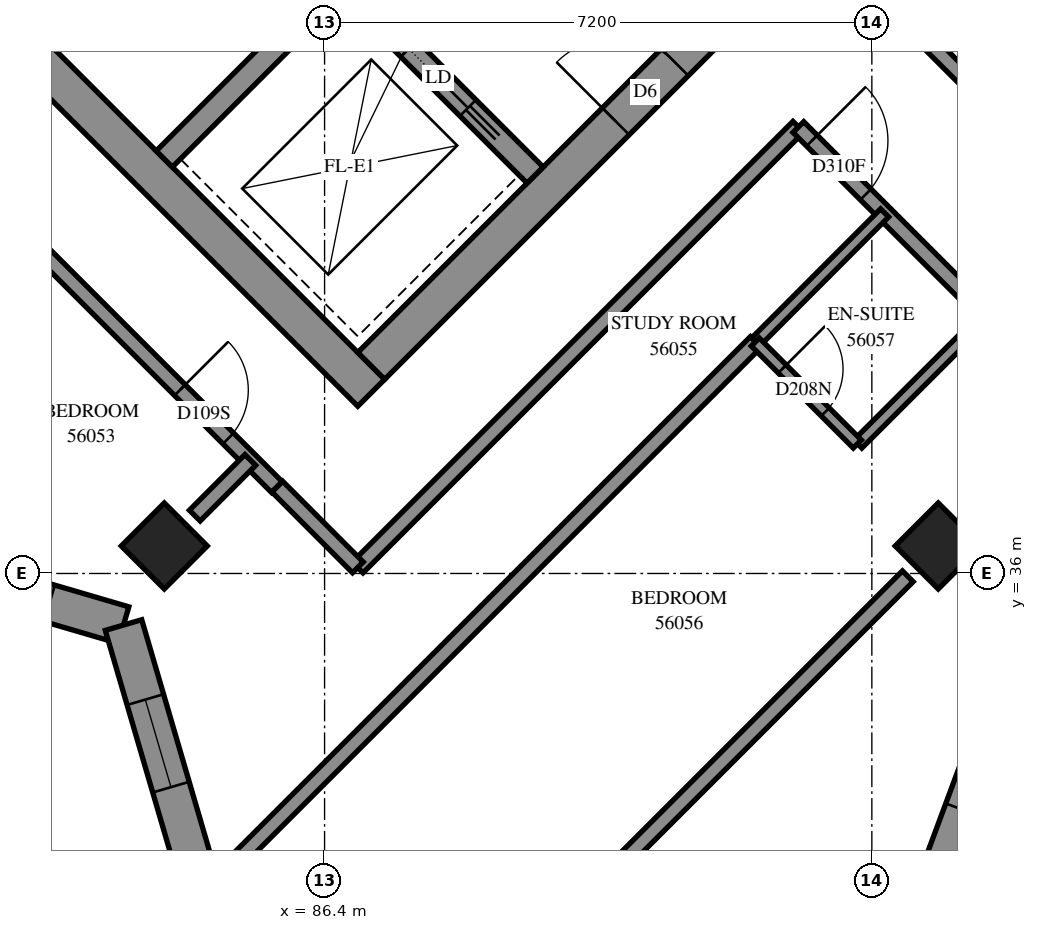
"""IFC4 building model, lengths in metres.
Left out: names, types, materials, properties, quantities, classifications, styles, units other than length and angle.
Written with IfcOpenShell. Run it as: python <this file> out.ifc"""

import sys

from ifc_helpers import new_model, si_unit, direction, frame, frame_2d, origin, origin_2d, place, context, subcontext, project, spatial, polyline, rectangle, outline, extrude, element, fill, save


model = new_model("IFC4")
c1 = context("Model", 3, precision=1e-05, world=origin(), true_north=direction((0.0, 1.0)))
c2 = subcontext(c1, "Body", "Model", "MODEL_VIEW")
j1 = project(units=[si_unit("LENGTHUNIT", "METRE"), si_unit("PLANEANGLEUNIT", "RADIAN")], contexts=[c1])
p1 = place(None, origin())
s1 = spatial("IfcSite", under=j1, at=p1, CompositionType="ELEMENT")
p2 = place(p1, origin())
s2 = spatial("IfcBuilding", under=s1, at=p2, CompositionType="ELEMENT")
p3 = place(p2, frame((0.0, 0.0, 206.6)))
s3 = spatial("IfcBuildingStorey", under=s2, at=p3, CompositionType="ELEMENT", Elevation=206.6)
for number, where, z_axis, x_axis in (
    (1, (84.291, 36.362, 0.0), (0.0, 0.0, 1.0), (0.707, -0.707, 0.0)),
    (2, (94.474, 36.362, 0.0), (0.0, 0.0, 1.0), (0.707, -0.707, 0.0)),
):
    element("IfcColumn", number, at=place(p3, frame(where, z_axis=z_axis, x_axis=x_axis)), inside=s3, PredefinedType="COLUMN", context=c2, shape_type="SweptSolid", body=[
        extrude(rectangle(XDim=0.8, YDim=0.8, at=origin_2d()), origin(), (0.0, 0.0, 1.0), 3.1),
    ])
p4 = place(p3, frame((76.124, 49.267, -0.3), z_axis=(0.0, 0.0, 1.0), x_axis=(0.7071067812, -0.7071067812, 0.0)))
e3 = element("IfcWall", 3, at=p4, inside=s3, PredefinedType="SHEAR", context=c2, shape_type="SweptSolid", body=[
    extrude(rectangle(XDim=15.4, YDim=0.5, at=frame_2d((7.7, 0.0))), origin(), (0.0, 0.0, 1.0), 2.7),
])
p5 = place(p3, frame((87.013, 38.731, -0.3), z_axis=(0.0, 0.0, 1.0), x_axis=(0.7071067812, 0.7071067812, 0.0)))
e4 = element("IfcWall", 4, at=p5, inside=s3, PredefinedType="SHEAR", context=c2, shape_type="SweptSolid", body=[
    extrude(rectangle(XDim=14.4, YDim=0.5, at=frame_2d((7.2, 0.0))), origin(), (0.0, 0.0, 1.0), 2.7),
])
p6 = place(p5, frame((4.55, 0.0, 0.3)))
e5 = element("IfcOpeningElement", 5, at=p6, cuts=e4, PredefinedType="OPENING", context=c2, shape_type="SweptSolid", body=[
    extrude(rectangle(XDim=1.1, YDim=2.1, at=frame_2d((0.55, 1.05))), frame((0.0, 0.26, 0.0), z_axis=(0.0, -1.0, 0.0), x_axis=(1.0, 0.0, 0.0)), (0.0, 0.0, 1.0), 0.52),
])
p7 = place(p5, frame((11.35, 0.0, 0.3)))
e6 = element("IfcOpeningElement", 6, at=p7, cuts=e4, PredefinedType="OPENING", context=c2, shape_type="SweptSolid", body=[
    extrude(rectangle(XDim=1.1, YDim=2.1, at=frame_2d((0.55, 1.05))), frame((0.0, 0.26, 0.0), z_axis=(0.0, -1.0, 0.0), x_axis=(1.0, 0.0, 0.0)), (0.0, 0.0, 1.0), 0.52),
])
p8 = place(p3, frame((84.291, 41.453, 0.0), z_axis=(0.0, 0.0, 1.0), x_axis=(0.7071067812, 0.7071067812, 0.0)))
e7 = element("IfcWall", 7, at=p8, inside=s3, PredefinedType="SOLIDWALL", context=c2, shape_type="SweptSolid", body=[
    extrude(rectangle(XDim=3.3, YDim=0.3, at=frame_2d((1.65, 0.0))), origin(), (0.0, 0.0, 1.0), 3.1),
])
p9 = place(p3, frame((78.988, 51.423, 0.0), z_axis=(0.0, 0.0, 1.0), x_axis=(0.7071067812, -0.7071067812, 0.0)))
e8 = element("IfcWall", 8, at=p9, inside=s3, PredefinedType="SOLIDWALL", context=c2, shape_type="SweptSolid", body=[
    extrude(rectangle(XDim=14.4, YDim=0.3, at=frame_2d((7.2, 0.0))), origin(), (0.0, 0.0, 1.0), 3.1),
])
p10 = place(p9, frame((1.35, 0.0, 0.0)))
e9 = element("IfcOpeningElement", 9, at=p10, cuts=e8, PredefinedType="OPENING", context=c2, shape_type="SweptSolid", body=[
    extrude(rectangle(XDim=0.9, YDim=2.1, at=frame_2d((0.45, 1.05))), frame((0.0, 0.16, 0.0), z_axis=(0.0, -1.0, 0.0), x_axis=(1.0, 0.0, 0.0)), (0.0, 0.0, 1.0), 0.32),
])
p11 = place(p9, frame((4.95, 0.0, 0.0)))
e10 = element("IfcOpeningElement", 10, at=p11, cuts=e8, PredefinedType="OPENING", context=c2, shape_type="SweptSolid", body=[
    extrude(rectangle(XDim=0.9, YDim=2.1, at=frame_2d((0.45, 1.05))), frame((0.0, 0.16, 0.0), z_axis=(0.0, -1.0, 0.0), x_axis=(1.0, 0.0, 0.0)), (0.0, 0.0, 1.0), 0.32),
])
p12 = place(p9, frame((8.55, 0.0, 0.0)))
e11 = element("IfcOpeningElement", 11, at=p12, cuts=e8, PredefinedType="OPENING", context=c2, shape_type="SweptSolid", body=[
    extrude(rectangle(XDim=0.9, YDim=2.1, at=frame_2d((0.45, 1.05))), frame((0.0, 0.16, 0.0), z_axis=(0.0, -1.0, 0.0), x_axis=(1.0, 0.0, 0.0)), (0.0, 0.0, 1.0), 0.32),
])
p13 = place(p9, frame((12.05, 0.0, 0.0)))
e12 = element("IfcOpeningElement", 12, at=p13, cuts=e8, PredefinedType="OPENING", context=c2, shape_type="SweptSolid", body=[
    extrude(rectangle(XDim=1.1, YDim=2.1, at=frame_2d((0.55, 1.05))), frame((0.0, 0.16, 0.0), z_axis=(0.0, -1.0, 0.0), x_axis=(1.0, 0.0, 0.0)), (0.0, 0.0, 1.0), 0.32),
])
p14 = place(p3, frame((94.281, 31.47, 0.0), z_axis=(0.0, 0.0, 1.0), x_axis=(0.3481903374, 0.9374238577, 0.0)))
e13 = element("IfcWall", 13, at=p14, inside=s3, PredefinedType="SOLIDWALL", context=c2, shape_type="SweptSolid", body=[
    extrude(outline(polyline([(-0.12, -0.25), (5.16, -0.25), (5.39, 0.25), (0.12, 0.25), (-0.12, -0.25)])), origin(), (0.0, 0.0, 1.0), 3.1),
])
p15 = place(p14, frame((1.512, 0.0, 0.45)))
e14 = element("IfcOpeningElement", 14, at=p15, cuts=e13, PredefinedType="OPENING", context=c2, shape_type="SweptSolid", body=[
    extrude(rectangle(XDim=1.3, YDim=2.5, at=frame_2d((0.65, 1.25))), frame((0.0, 0.26, 0.0), z_axis=(0.0, -1.0, 0.0), x_axis=(1.0, 0.0, 0.0)), (0.0, 0.0, 1.0), 0.52),
])
p16 = place(p14, frame((3.012, 0.0, 0.45)))
e15 = element("IfcOpeningElement", 15, at=p16, cuts=e13, PredefinedType="OPENING", context=c2, shape_type="SweptSolid", body=[
    extrude(rectangle(XDim=1.3, YDim=2.5, at=frame_2d((0.65, 1.25))), frame((0.0, 0.26, 0.0), z_axis=(0.0, -1.0, 0.0), x_axis=(1.0, 0.0, 0.0)), (0.0, 0.0, 1.0), 0.52),
])
p17 = place(p3, frame((79.361, 36.608, 0.0), z_axis=(0.0, 0.0, 1.0), x_axis=(0.9597039352, -0.2810130901, 0.0)))
e16 = element("IfcWall", 16, at=p17, inside=s3, PredefinedType="SOLIDWALL", context=c2, shape_type="SweptSolid", body=[
    extrude(outline(polyline([(-0.143, -0.25), (4.441, -0.25), (4.715, 0.25), (0.143, 0.25), (-0.143, -0.25)])), origin(), (0.0, 0.0, 1.0), 3.1),
])
p18 = place(p17, frame((0.563, 0.0, 0.45)))
e17 = element("IfcOpeningElement", 17, at=p18, cuts=e16, PredefinedType="OPENING", context=c2, shape_type="SweptSolid", body=[
    extrude(rectangle(XDim=1.3, YDim=2.5, at=frame_2d((0.65, 1.25))), frame((0.0, 0.26, 0.0), z_axis=(0.0, -1.0, 0.0), x_axis=(1.0, 0.0, 0.0)), (0.0, 0.0, 1.0), 0.52),
])
p19 = place(p17, frame((2.263, 0.0, 0.45)))
e18 = element("IfcOpeningElement", 18, at=p19, cuts=e16, PredefinedType="OPENING", context=c2, shape_type="SweptSolid", body=[
    extrude(rectangle(XDim=1.3, YDim=2.5, at=frame_2d((0.65, 1.25))), frame((0.0, 0.26, 0.0), z_axis=(0.0, -1.0, 0.0), x_axis=(1.0, 0.0, 0.0)), (0.0, 0.0, 1.0), 0.52),
])
p20 = place(p3, frame((83.755, 35.321, 0.0), z_axis=(0.0, 0.0, 1.0), x_axis=(0.2810130901, -0.9597039352, 0.0)))
e19 = element("IfcWall", 19, at=p20, inside=s3, PredefinedType="SOLIDWALL", context=c2, shape_type="SweptSolid", body=[
    extrude(outline(polyline([(0.137, -0.25), (4.721, -0.25), (4.435, 0.25), (-0.137, 0.25), (0.137, -0.25)])), origin(), (0.0, 0.0, 1.0), 3.1),
])
p21 = place(p20, frame((1.022, 0.0, 0.45)))
e20 = element("IfcOpeningElement", 20, at=p21, cuts=e19, PredefinedType="OPENING", context=c2, shape_type="SweptSolid", body=[
    extrude(rectangle(XDim=1.2, YDim=2.5, at=frame_2d((0.6, 1.25))), frame((0.0, 0.26, 0.0), z_axis=(0.0, -1.0, 0.0), x_axis=(1.0, 0.0, 0.0)), (0.0, 0.0, 1.0), 0.52),
])
p22 = place(p3, frame((84.996, 31.971, 0.0), z_axis=(0.0, 0.0, 1.0), x_axis=(0.7072316927, 0.7069818476, 0.0)))
e21 = element("IfcWall", 21, at=p22, inside=s3, PredefinedType="PARTITIONING", context=c2, shape_type="SweptSolid", body=[
    extrude(rectangle(XDim=10.006, YDim=0.2, at=frame_2d((5.003, 0.0))), origin(), (0.0, 0.0, 1.0), 3.1),
])
p23 = place(p3, frame((86.835, 36.079, 0.0), z_axis=(0.0, 0.0, 1.0), x_axis=(0.7071067812, 0.7071067812, 0.0)))
e22 = element("IfcWall", 22, at=p23, inside=s3, PredefinedType="PARTITIONING", context=c2, shape_type="SweptSolid", body=[
    extrude(rectangle(XDim=8.2, YDim=0.2, at=frame_2d((4.1, 0.0))), origin(), (0.0, 0.0, 1.0), 3.1),
])
p24 = place(p3, frame((80.849, 42.061, 0.0), z_axis=(0.0, 0.0, 1.0), x_axis=(0.7071067812, -0.7071067812, 0.0)))
e23 = element("IfcWall", 23, at=p24, inside=s3, PredefinedType="PARTITIONING", context=c2, shape_type="SweptSolid", body=[
    extrude(rectangle(XDim=6.964, YDim=0.2, at=frame_2d((3.482, 0.0))), origin(), (0.0, 0.0, 1.0), 3.1),
])
p25 = place(p24, frame((5.159, 0.0, 0.0)))
e24 = element("IfcOpeningElement", 24, at=p25, cuts=e23, PredefinedType="OPENING", context=c2, shape_type="SweptSolid", body=[
    extrude(rectangle(XDim=0.9, YDim=2.1, at=frame_2d((0.45, 1.05))), frame((0.0, 0.11, 0.0), z_axis=(0.0, -1.0, 0.0), x_axis=(1.0, 0.0, 0.0)), (0.0, 0.0, 1.0), 0.22),
])
p26 = place(p3, frame((89.781, 31.671, 0.0), z_axis=(0.0, 0.0, 1.0), x_axis=(0.7071067812, 0.7071067812, 0.0)))
e25 = element("IfcWall", 25, at=p26, inside=s3, PredefinedType="PARTITIONING", context=c2, shape_type="SweptSolid", body=[
    extrude(rectangle(XDim=6.07, YDim=0.2, at=frame_2d((3.035, 0.0))), origin(), (0.0, 0.0, 1.0), 2.6),
])
p27 = place(p3, frame((94.047, 43.287, 0.0), z_axis=(0.0, 0.0, 1.0), x_axis=(0.7071067812, -0.7071067812, 0.0)))
e26 = element("IfcWall", 26, at=p27, inside=s3, PredefinedType="PARTITIONING", context=c2, shape_type="SweptSolid", body=[
    extrude(rectangle(XDim=5.199, YDim=0.2, at=frame_2d((2.599, 0.0))), origin(), (0.0, 0.0, 1.0), 3.1),
])
p28 = place(p27, frame((3.898, 0.0, 0.0)))
e27 = element("IfcOpeningElement", 27, at=p28, cuts=e26, PredefinedType="OPENING", context=c2, shape_type="SweptSolid", body=[
    extrude(rectangle(XDim=0.9, YDim=2.1, at=frame_2d((0.45, 1.05))), frame((0.0, 0.11, 0.0), z_axis=(0.0, -1.0, 0.0), x_axis=(1.0, 0.0, 0.0)), (0.0, 0.0, 1.0), 0.22),
])
p29 = place(p3, frame((92.633, 41.873, 0.0), z_axis=(0.0, 0.0, 1.0), x_axis=(0.7071067812, -0.7071067812, 0.0)))
e28 = element("IfcWall", 28, at=p29, inside=s3, PredefinedType="PARTITIONING", context=c2, shape_type="SweptSolid", body=[
    extrude(rectangle(XDim=5.199, YDim=0.2, at=frame_2d((2.599, 0.0))), origin(), (0.0, 0.0, 1.0), 3.1),
])
p30 = place(p29, frame((0.253, 0.0, 0.0)))
e29 = element("IfcOpeningElement", 29, at=p30, cuts=e28, PredefinedType="OPENING", context=c2, shape_type="SweptSolid", body=[
    extrude(rectangle(XDim=1.0, YDim=2.1, at=frame_2d((0.5, 1.05))), frame((0.0, 0.11, 0.0), z_axis=(0.0, -1.0, 0.0), x_axis=(1.0, 0.0, 0.0)), (0.0, 0.0, 1.0), 0.22),
])
p31 = place(p29, frame((3.948, 0.0, 0.0)))
e30 = element("IfcOpeningElement", 30, at=p31, cuts=e28, PredefinedType="OPENING", context=c2, shape_type="SweptSolid", body=[
    extrude(rectangle(XDim=0.9, YDim=2.1, at=frame_2d((0.45, 1.05))), frame((0.0, 0.11, 0.0), z_axis=(0.0, -1.0, 0.0), x_axis=(1.0, 0.0, 0.0)), (0.0, 0.0, 1.0), 0.22),
])
for number, where, z_axis, x_axis in (
    (31, (92.072, 39.046, 0.0), (0.0, 0.0, 1.0), (0.707, 0.708, 0.0)),
    (32, (93.415, 37.703, 0.0), (0.0, 0.0, 1.0), (0.708, 0.707, 0.0)),
):
    element("IfcWall", number, at=place(p3, frame(where, z_axis=z_axis, x_axis=x_axis)), inside=s3, PredefinedType="PARTITIONING", context=c2, shape_type="SweptSolid", body=[
        extrude(rectangle(XDim=2.4, YDim=0.15, at=frame_2d((1.2, 0.0))), origin(), (0.0, 0.0, 1.0), 3.1),
    ])
p32 = place(p3, frame((92.067, 39.045, 0.0), z_axis=(0.0, 0.0, 1.0), x_axis=(0.7071067812, -0.7071067812, 0.0)))
e33 = element("IfcWall", 33, at=p32, inside=s3, PredefinedType="PARTITIONING", context=c2, shape_type="SweptSolid", body=[
    extrude(rectangle(XDim=1.898, YDim=0.15, at=frame_2d((0.949, 0.0))), origin(), (0.0, 0.0, 1.0), 3.1),
])
p33 = place(p32, frame((0.501, 0.0, 0.0)))
e34 = element("IfcOpeningElement", 34, at=p33, cuts=e33, PredefinedType="OPENING", context=c2, shape_type="SweptSolid", body=[
    extrude(rectangle(XDim=0.8, YDim=2.1, at=frame_2d((0.4, 1.05))), frame((0.0, 0.085, 0.0), z_axis=(0.0, -1.0, 0.0), x_axis=(1.0, 0.0, 0.0)), (0.0, 0.0, 1.0), 0.17),
])
p34 = place(p3, frame((85.778, 37.142, 0.0), z_axis=(0.0, 0.0, 1.0), x_axis=(0.7064400143, -0.70777292, 0.0)))
e35 = element("IfcWall", 35, at=p34, inside=s3, PredefinedType="PARTITIONING", context=c2, shape_type="SweptSolid", body=[
    extrude(rectangle(XDim=1.5, YDim=0.2, at=frame_2d((0.75, 0.0))), origin(), (0.0, 0.0, 1.0), 3.1),
])
p35 = place(p3, frame((84.693, 36.761, 0.0), z_axis=(0.0, 0.0, 1.0), x_axis=(0.7061388061, 0.708073433, 0.0)))
e36 = element("IfcWall", 36, at=p35, inside=s3, PredefinedType="PARTITIONING", context=c2, shape_type="SweptSolid", body=[
    extrude(rectangle(XDim=1.034, YDim=0.2, at=frame_2d((0.517, 0.0))), origin(), (0.0, 0.0, 1.0), 3.1),
])
p36 = place(p15, origin())
e37 = element("IfcWindow", 37, at=p36, inside=s3, PartitioningType="SINGLE_PANEL", PredefinedType="WINDOW", context=c2, shape_type="SweptSolid", body=[
    extrude(rectangle(XDim=1.3, YDim=2.5, at=frame_2d((0.65, 1.25))), frame((0.0, 0.18, 0.0), z_axis=(0.0, -1.0, 0.0), x_axis=(1.0, 0.0, 0.0)), (0.0, 0.0, 1.0), 0.06),
])
fill(e14, e37)
p37 = place(p19, origin())
e38 = element("IfcWindow", 38, at=p37, inside=s3, PartitioningType="SINGLE_PANEL", PredefinedType="WINDOW", context=c2, shape_type="SweptSolid", body=[
    extrude(rectangle(XDim=1.3, YDim=2.5, at=frame_2d((0.65, 1.25))), frame((0.0, 0.18, 0.0), z_axis=(0.0, -1.0, 0.0), x_axis=(1.0, 0.0, 0.0)), (0.0, 0.0, 1.0), 0.06),
])
fill(e18, e38)
p38 = place(p21, origin())
e39 = element("IfcWindow", 39, at=p38, inside=s3, PartitioningType="SINGLE_PANEL", PredefinedType="WINDOW", context=c2, shape_type="SweptSolid", body=[
    extrude(rectangle(XDim=1.2, YDim=2.5, at=frame_2d((0.6, 1.25))), frame((0.0, 0.18, 0.0), z_axis=(0.0, -1.0, 0.0), x_axis=(1.0, 0.0, 0.0)), (0.0, 0.0, 1.0), 0.06),
])
fill(e20, e39)
p39 = place(p6, origin())
e40 = element("IfcDoor", 40, at=p39, inside=s3, OperationType="DOUBLE_DOOR_SINGLE_SWING", PredefinedType="DOOR", context=c2, shape_type="SweptSolid", body=[
    extrude(rectangle(XDim=1.1, YDim=2.1, at=frame_2d((0.55, 1.05))), frame((0.0, 0.025, 0.0), z_axis=(0.0, -1.0, 0.0), x_axis=(1.0, 0.0, 0.0)), (0.0, 0.0, 1.0), 0.05),
])
fill(e5, e40)
p40 = place(p13, origin())
e41 = element("IfcDoor", 41, at=p40, inside=s3, OperationType="SLIDING_TO_RIGHT", PredefinedType="DOOR", context=c2, shape_type="SweptSolid", body=[
    extrude(rectangle(XDim=1.1, YDim=2.1, at=frame_2d((0.55, 1.05))), frame((0.0, 0.025, 0.0), z_axis=(0.0, -1.0, 0.0), x_axis=(1.0, 0.0, 0.0)), (0.0, 0.0, 1.0), 0.05),
])
fill(e12, e41)
p41 = place(p25, origin())
e42 = element("IfcDoor", 42, at=p41, inside=s3, OperationType="SINGLE_SWING_RIGHT", PredefinedType="DOOR", context=c2, shape_type="SweptSolid", body=[
    extrude(rectangle(XDim=0.9, YDim=2.1, at=frame_2d((0.45, 1.05))), frame((0.0, 0.025, 0.0), z_axis=(0.0, -1.0, 0.0), x_axis=(1.0, 0.0, 0.0)), (0.0, 0.0, 1.0), 0.05),
])
fill(e24, e42)
p42 = place(p30, origin())
e43 = element("IfcDoor", 43, at=p42, inside=s3, OperationType="SINGLE_SWING_RIGHT", PredefinedType="DOOR", context=c2, shape_type="SweptSolid", body=[
    extrude(rectangle(XDim=1.0, YDim=2.1, at=frame_2d((0.5, 1.05))), frame((0.0, 0.025, 0.0), z_axis=(0.0, -1.0, 0.0), x_axis=(1.0, 0.0, 0.0)), (0.0, 0.0, 1.0), 0.05),
])
fill(e29, e43)
p43 = place(p33, origin())
e44 = element("IfcDoor", 44, at=p43, inside=s3, OperationType="SINGLE_SWING_RIGHT", PredefinedType="DOOR", context=c2, shape_type="SweptSolid", body=[
    extrude(rectangle(XDim=0.8, YDim=2.1, at=frame_2d((0.4, 1.05))), frame((0.0, 0.025, 0.0), z_axis=(0.0, -1.0, 0.0), x_axis=(1.0, 0.0, 0.0)), (0.0, 0.0, 1.0), 0.05),
])
fill(e34, e44)
save(model, sys.argv[1])
